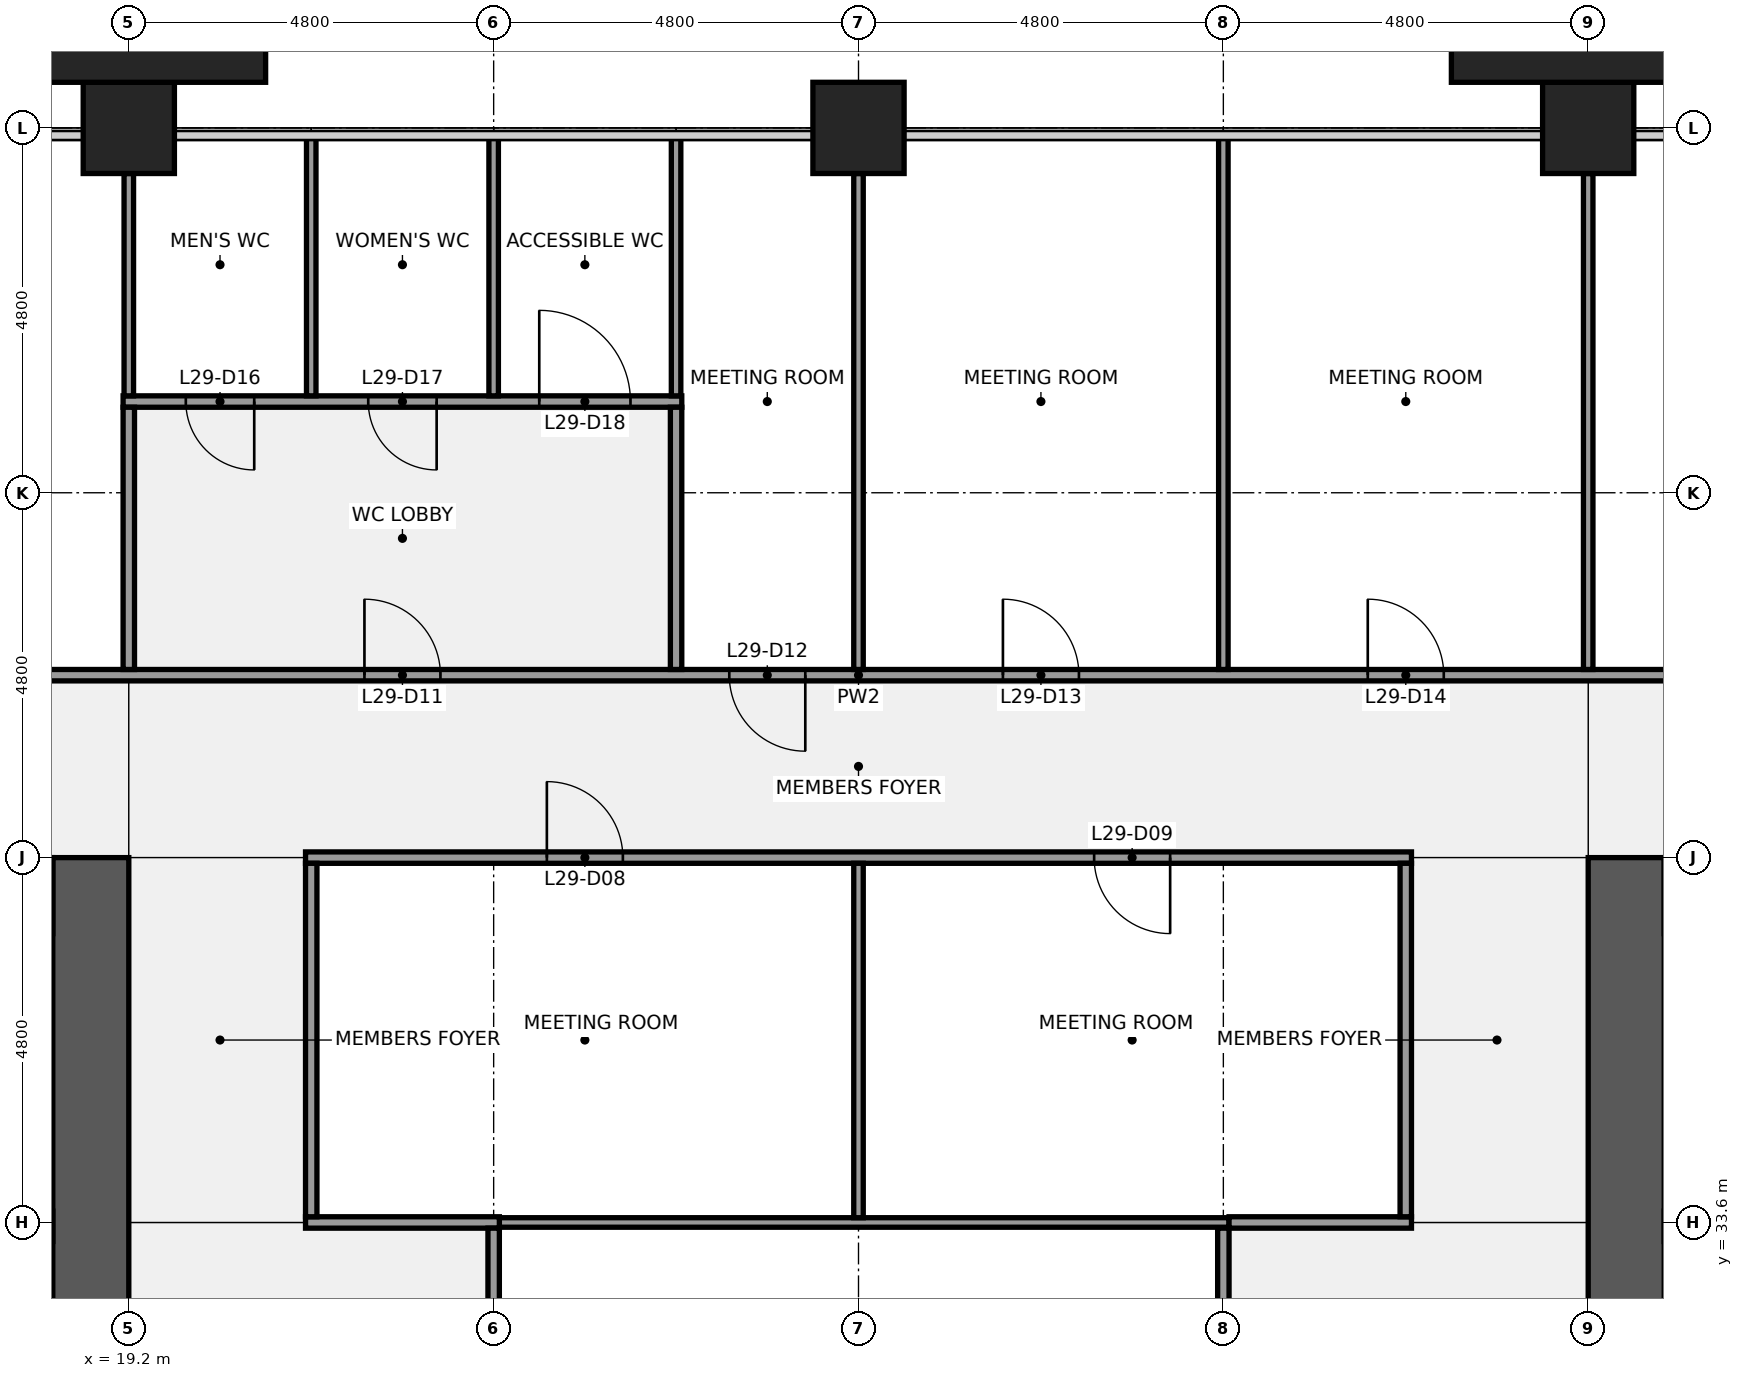
"""IFC4 building model, lengths in metres.
Left out: names, types, materials, properties, quantities, classifications, styles, units other than length and angle.
Written with IfcOpenShell. Run it as: python <this file> out.ifc"""

import sys

from ifc_helpers import new_model, si_unit, direction, frame, frame_2d, origin, origin_2d, place, context, subcontext, project, spatial, rectangle, extrude, element, fill, save


model = new_model("IFC4")
c1 = context("Model", 3, precision=1e-05, world=origin(), true_north=direction((0.0, 1.0)))
c2 = subcontext(c1, "Body", "Model", "MODEL_VIEW")
j1 = project(units=[si_unit("LENGTHUNIT", "METRE"), si_unit("PLANEANGLEUNIT", "RADIAN")], contexts=[c1])
p1 = place(None, origin())
s1 = spatial("IfcSite", under=j1, at=p1, CompositionType="ELEMENT")
p2 = place(p1, origin())
s2 = spatial("IfcBuilding", under=s1, at=p2, CompositionType="ELEMENT")
p3 = place(p2, frame((0.0, 0.0, 136.1)))
s3 = spatial("IfcBuildingStorey", under=s2, at=p3, CompositionType="ELEMENT", Elevation=136.1)
for number, where, z_axis, x_axis in (
    (1, (19.2, 48.0, 0.0), (0.0, 0.0, 1.0), (1.0, 0.0, 0.0)),
    (2, (28.8, 48.0, 0.0), (0.0, 0.0, 1.0), (1.0, 0.0, 0.0)),
    (3, (38.4, 48.0, 0.0), (0.0, 0.0, 1.0), (1.0, 0.0, 0.0)),
):
    element("IfcColumn", number, at=place(p3, frame(where, z_axis=z_axis, x_axis=x_axis)), inside=s3, PredefinedType="COLUMN", context=c2, shape_type="SweptSolid", body=[
        extrude(rectangle(XDim=1.2, YDim=1.2, at=origin_2d()), origin(), (0.0, 0.0, 1.0), 4.0),
    ])
p4 = place(p3, frame((18.7, 38.4, 0.0), z_axis=(0.0, 0.0, 1.0), x_axis=(0.0, -1.0, 0.0)))
e4 = element("IfcWall", 4, at=p4, inside=s3, PredefinedType="SHEAR", context=c2, shape_type="SweptSolid", body=[
    extrude(rectangle(XDim=28.8, YDim=1.0, at=frame_2d((14.4, 0.0))), origin(), (0.0, 0.0, 1.0), 3.84),
])
p5 = place(p4, frame((18.3, 0.0, 0.0)))
e5 = element("IfcOpeningElement", 5, at=p5, cuts=e4, PredefinedType="OPENING", context=c2, shape_type="SweptSolid", body=[
    extrude(rectangle(XDim=1.8, YDim=2.1, at=frame_2d((0.9, 1.05))), frame((0.0, 0.51, 0.0), z_axis=(0.0, -1.0, 0.0), x_axis=(1.0, 0.0, 0.0)), (0.0, 0.0, 1.0), 1.02),
])
p6 = place(p4, frame((8.7, 0.0, 0.0)))
e6 = element("IfcOpeningElement", 6, at=p6, cuts=e4, PredefinedType="OPENING", context=c2, shape_type="SweptSolid", body=[
    extrude(rectangle(XDim=1.8, YDim=2.1, at=frame_2d((0.9, 1.05))), frame((0.0, 0.51, 0.0), z_axis=(0.0, -1.0, 0.0), x_axis=(1.0, 0.0, 0.0)), (0.0, 0.0, 1.0), 1.02),
])
p7 = place(p3, frame((1.0, 33.55, 0.0), z_axis=(0.0, 0.0, 1.0), x_axis=(1.0, 0.0, 0.0)))
e7 = element("IfcWall", 7, at=p7, inside=s3, PredefinedType="SHEAR", context=c2, shape_type="SweptSolid", body=[
    extrude(rectangle(XDim=17.2, YDim=0.4, at=frame_2d((8.6, 0.0))), origin(), (0.0, 0.0, 1.0), 3.84),
])
p8 = place(p3, frame((38.9, 9.6, 0.0), z_axis=(0.0, 0.0, 1.0), x_axis=(0.0, 1.0, 0.0)))
e8 = element("IfcWall", 8, at=p8, inside=s3, PredefinedType="SHEAR", context=c2, shape_type="SweptSolid", body=[
    extrude(rectangle(XDim=28.8, YDim=1.0, at=frame_2d((14.4, 0.0))), origin(), (0.0, 0.0, 1.0), 3.84),
])
p9 = place(p8, frame((8.7, 0.0, 0.0)))
e9 = element("IfcOpeningElement", 9, at=p9, cuts=e8, PredefinedType="OPENING", context=c2, shape_type="SweptSolid", body=[
    extrude(rectangle(XDim=1.8, YDim=2.1, at=frame_2d((0.9, 1.05))), frame((0.0, 0.51, 0.0), z_axis=(0.0, -1.0, 0.0), x_axis=(1.0, 0.0, 0.0)), (0.0, 0.0, 1.0), 1.02),
])
p10 = place(p8, frame((18.3, 0.0, 0.0)))
e10 = element("IfcOpeningElement", 10, at=p10, cuts=e8, PredefinedType="OPENING", context=c2, shape_type="SweptSolid", body=[
    extrude(rectangle(XDim=1.8, YDim=2.1, at=frame_2d((0.9, 1.05))), frame((0.0, 0.51, 0.0), z_axis=(0.0, -1.0, 0.0), x_axis=(1.0, 0.0, 0.0)), (0.0, 0.0, 1.0), 1.02),
])
p11 = place(p3, frame((24.075, 33.6, 0.0), z_axis=(0.0, 0.0, 1.0), x_axis=(1.0, 0.0, 0.0)))
e11 = element("IfcWall", 11, at=p11, inside=s3, PredefinedType="PARTITIONING", context=c2, shape_type="SweptSolid", body=[
    extrude(rectangle(XDim=9.6, YDim=0.125, at=frame_2d((4.8, 0.0))), origin(), (0.0, 0.0, 1.0), 2.849),
])
p12 = place(p3, frame((21.525, 33.6, 0.0), z_axis=(0.0, 0.0, 1.0), x_axis=(1.0, 0.0, 0.0)))
e12 = element("IfcWall", 12, at=p12, inside=s3, PredefinedType="PARTITIONING", context=c2, shape_type="SweptSolid", body=[
    extrude(rectangle(XDim=2.55, YDim=0.15, at=frame_2d((1.275, 0.0))), origin(), (0.0, 0.0, 1.0), 2.849),
])
p13 = place(p3, frame((33.675, 33.6, 0.0), z_axis=(0.0, 0.0, 1.0), x_axis=(1.0, 0.0, 0.0)))
e13 = element("IfcWall", 13, at=p13, inside=s3, PredefinedType="PARTITIONING", context=c2, shape_type="SweptSolid", body=[
    extrude(rectangle(XDim=2.4, YDim=0.15, at=frame_2d((1.2, 0.0))), origin(), (0.0, 0.0, 1.0), 2.849),
])
p14 = place(p3, frame((21.525, 38.4, 0.0), z_axis=(0.0, 0.0, 1.0), x_axis=(1.0, 0.0, 0.0)))
e14 = element("IfcWall", 14, at=p14, inside=s3, PredefinedType="PARTITIONING", context=c2, shape_type="SweptSolid", body=[
    extrude(rectangle(XDim=14.55, YDim=0.15, at=frame_2d((7.275, 0.0))), origin(), (0.0, 0.0, 1.0), 2.849),
])
p15 = place(p14, frame((3.175, 0.0, 0.0)))
e15 = element("IfcOpeningElement", 15, at=p15, cuts=e14, PredefinedType="OPENING", context=c2, shape_type="SweptSolid", body=[
    extrude(rectangle(XDim=1.0, YDim=2.1, at=frame_2d((0.5, 1.05))), frame((0.0, 0.085, 0.0), z_axis=(0.0, -1.0, 0.0), x_axis=(1.0, 0.0, 0.0)), (0.0, 0.0, 1.0), 0.17),
])
p16 = place(p14, frame((10.375, 0.0, 0.0)))
e16 = element("IfcOpeningElement", 16, at=p16, cuts=e14, PredefinedType="OPENING", context=c2, shape_type="SweptSolid", body=[
    extrude(rectangle(XDim=1.0, YDim=2.1, at=frame_2d((0.5, 1.05))), frame((0.0, 0.085, 0.0), z_axis=(0.0, -1.0, 0.0), x_axis=(1.0, 0.0, 0.0)), (0.0, 0.0, 1.0), 0.17),
])
p17 = place(p3, frame((9.525, 40.8, 0.0), z_axis=(0.0, 0.0, 1.0), x_axis=(1.0, 0.0, 0.0)))
e17 = element("IfcWall", 17, at=p17, inside=s3, PredefinedType="PARTITIONING", context=c2, shape_type="SweptSolid", body=[
    extrude(rectangle(XDim=38.55, YDim=0.15, at=frame_2d((19.275, 0.0))), origin(), (0.0, 0.0, 1.0), 2.849),
])
p18 = place(p17, frame((4.375, 0.0, 0.0)))
e18 = element("IfcOpeningElement", 18, at=p18, cuts=e17, PredefinedType="OPENING", context=c2, shape_type="SweptSolid", body=[
    extrude(rectangle(XDim=1.0, YDim=2.1, at=frame_2d((0.5, 1.05))), frame((0.0, 0.085, 0.0), z_axis=(0.0, -1.0, 0.0), x_axis=(1.0, 0.0, 0.0)), (0.0, 0.0, 1.0), 0.17),
])
p19 = place(p17, frame((12.775, 0.0, 0.0)))
e19 = element("IfcOpeningElement", 19, at=p19, cuts=e17, PredefinedType="OPENING", context=c2, shape_type="SweptSolid", body=[
    extrude(rectangle(XDim=1.0, YDim=2.1, at=frame_2d((0.5, 1.05))), frame((0.0, 0.085, 0.0), z_axis=(0.0, -1.0, 0.0), x_axis=(1.0, 0.0, 0.0)), (0.0, 0.0, 1.0), 0.17),
])
p20 = place(p17, frame((17.575, 0.0, 0.0)))
e20 = element("IfcOpeningElement", 20, at=p20, cuts=e17, PredefinedType="OPENING", context=c2, shape_type="SweptSolid", body=[
    extrude(rectangle(XDim=1.0, YDim=2.1, at=frame_2d((0.5, 1.05))), frame((0.0, 0.085, 0.0), z_axis=(0.0, -1.0, 0.0), x_axis=(1.0, 0.0, 0.0)), (0.0, 0.0, 1.0), 0.17),
])
p21 = place(p17, frame((21.175, 0.0, 0.0)))
e21 = element("IfcOpeningElement", 21, at=p21, cuts=e17, PredefinedType="OPENING", context=c2, shape_type="SweptSolid", body=[
    extrude(rectangle(XDim=1.0, YDim=2.1, at=frame_2d((0.5, 1.05))), frame((0.0, 0.085, 0.0), z_axis=(0.0, -1.0, 0.0), x_axis=(1.0, 0.0, 0.0)), (0.0, 0.0, 1.0), 0.17),
])
p22 = place(p17, frame((25.975, 0.0, 0.0)))
e22 = element("IfcOpeningElement", 22, at=p22, cuts=e17, PredefinedType="OPENING", context=c2, shape_type="SweptSolid", body=[
    extrude(rectangle(XDim=1.0, YDim=2.1, at=frame_2d((0.5, 1.05))), frame((0.0, 0.085, 0.0), z_axis=(0.0, -1.0, 0.0), x_axis=(1.0, 0.0, 0.0)), (0.0, 0.0, 1.0), 0.17),
])
p23 = place(p17, frame((33.175, 0.0, 0.0)))
e23 = element("IfcOpeningElement", 23, at=p23, cuts=e17, PredefinedType="OPENING", context=c2, shape_type="SweptSolid", body=[
    extrude(rectangle(XDim=1.0, YDim=2.1, at=frame_2d((0.5, 1.05))), frame((0.0, 0.085, 0.0), z_axis=(0.0, -1.0, 0.0), x_axis=(1.0, 0.0, 0.0)), (0.0, 0.0, 1.0), 0.17),
])
p24 = place(p3, frame((19.125, 44.4, 0.0), z_axis=(0.0, 0.0, 1.0), x_axis=(1.0, 0.0, 0.0)))
e24 = element("IfcWall", 24, at=p24, inside=s3, PredefinedType="PARTITIONING", context=c2, shape_type="SweptSolid", body=[
    extrude(rectangle(XDim=7.35, YDim=0.15, at=frame_2d((3.675, 0.0))), origin(), (0.0, 0.0, 1.0), 2.849),
])
p25 = place(p24, frame((0.825, 0.0, 0.0)))
e25 = element("IfcOpeningElement", 25, at=p25, cuts=e24, PredefinedType="OPENING", context=c2, shape_type="SweptSolid", body=[
    extrude(rectangle(XDim=0.9, YDim=2.1, at=frame_2d((0.45, 1.05))), frame((0.0, 0.085, 0.0), z_axis=(0.0, -1.0, 0.0), x_axis=(1.0, 0.0, 0.0)), (0.0, 0.0, 1.0), 0.17),
])
p26 = place(p24, frame((3.225, 0.0, 0.0)))
e26 = element("IfcOpeningElement", 26, at=p26, cuts=e24, PredefinedType="OPENING", context=c2, shape_type="SweptSolid", body=[
    extrude(rectangle(XDim=0.9, YDim=2.1, at=frame_2d((0.45, 1.05))), frame((0.0, 0.085, 0.0), z_axis=(0.0, -1.0, 0.0), x_axis=(1.0, 0.0, 0.0)), (0.0, 0.0, 1.0), 0.17),
])
p27 = place(p24, frame((5.475, 0.0, 0.0)))
e27 = element("IfcOpeningElement", 27, at=p27, cuts=e24, PredefinedType="OPENING", context=c2, shape_type="SweptSolid", body=[
    extrude(rectangle(XDim=1.2, YDim=2.1, at=frame_2d((0.6, 1.05))), frame((0.0, 0.085, 0.0), z_axis=(0.0, -1.0, 0.0), x_axis=(1.0, 0.0, 0.0)), (0.0, 0.0, 1.0), 0.17),
])
p28 = place(p3, frame((19.2, 44.475, 0.0), z_axis=(0.0, 0.0, 1.0), x_axis=(0.0, 1.0, 0.0)))
e28 = element("IfcWall", 28, at=p28, inside=s3, PredefinedType="PARTITIONING", context=c2, shape_type="SweptSolid", body=[
    extrude(rectangle(XDim=2.925, YDim=0.125, at=frame_2d((1.462, 0.0))), origin(), (0.0, 0.0, 1.0), 2.849),
])
p29 = place(p3, frame((19.2, 40.875, 0.0), z_axis=(0.0, 0.0, 1.0), x_axis=(0.0, 1.0, 0.0)))
e29 = element("IfcWall", 29, at=p29, inside=s3, PredefinedType="PARTITIONING", context=c2, shape_type="SweptSolid", body=[
    extrude(rectangle(XDim=3.45, YDim=0.15, at=frame_2d((1.725, 0.0))), origin(), (0.0, 0.0, 1.0), 2.849),
])
p30 = place(p3, frame((21.6, 44.475, 0.0), z_axis=(0.0, 0.0, 1.0), x_axis=(0.0, 1.0, 0.0)))
e30 = element("IfcWall", 30, at=p30, inside=s3, PredefinedType="PARTITIONING", context=c2, shape_type="SweptSolid", body=[
    extrude(rectangle(XDim=3.425, YDim=0.125, at=frame_2d((1.712, 0.0))), origin(), (0.0, 0.0, 1.0), 2.849),
])
p31 = place(p3, frame((21.6, 33.675, 0.0), z_axis=(0.0, 0.0, 1.0), x_axis=(0.0, 1.0, 0.0)))
e31 = element("IfcWall", 31, at=p31, inside=s3, PredefinedType="PARTITIONING", context=c2, shape_type="SweptSolid", body=[
    extrude(rectangle(XDim=4.65, YDim=0.15, at=frame_2d((2.325, 0.0))), origin(), (0.0, 0.0, 1.0), 2.849),
])
p32 = place(p3, frame((24.0, 44.475, 0.0), z_axis=(0.0, 0.0, 1.0), x_axis=(0.0, 1.0, 0.0)))
e32 = element("IfcWall", 32, at=p32, inside=s3, PredefinedType="PARTITIONING", context=c2, shape_type="SweptSolid", body=[
    extrude(rectangle(XDim=3.425, YDim=0.125, at=frame_2d((1.712, 0.0))), origin(), (0.0, 0.0, 1.0), 2.849),
])
p33 = place(p3, frame((24.0, 28.875, 0.0), z_axis=(0.0, 0.0, 1.0), x_axis=(0.0, 1.0, 0.0)))
e33 = element("IfcWall", 33, at=p33, inside=s3, PredefinedType="PARTITIONING", context=c2, shape_type="SweptSolid", body=[
    extrude(rectangle(XDim=4.65, YDim=0.15, at=frame_2d((2.325, 0.0))), origin(), (0.0, 0.0, 1.0), 2.849),
])
p34 = place(p3, frame((26.4, 44.475, 0.0), z_axis=(0.0, 0.0, 1.0), x_axis=(0.0, 1.0, 0.0)))
e34 = element("IfcWall", 34, at=p34, inside=s3, PredefinedType="PARTITIONING", context=c2, shape_type="SweptSolid", body=[
    extrude(rectangle(XDim=3.425, YDim=0.125, at=frame_2d((1.712, 0.0))), origin(), (0.0, 0.0, 1.0), 2.849),
])
p35 = place(p3, frame((26.4, 40.875, 0.0), z_axis=(0.0, 0.0, 1.0), x_axis=(0.0, 1.0, 0.0)))
e35 = element("IfcWall", 35, at=p35, inside=s3, PredefinedType="PARTITIONING", context=c2, shape_type="SweptSolid", body=[
    extrude(rectangle(XDim=3.45, YDim=0.15, at=frame_2d((1.725, 0.0))), origin(), (0.0, 0.0, 1.0), 2.849),
])
p36 = place(p3, frame((28.8, 33.663, 0.0), z_axis=(0.0, 0.0, 1.0), x_axis=(0.0, 1.0, 0.0)))
e36 = element("IfcWall", 36, at=p36, inside=s3, PredefinedType="PARTITIONING", context=c2, shape_type="SweptSolid", body=[
    extrude(rectangle(XDim=4.662, YDim=0.125, at=frame_2d((2.331, 0.0))), origin(), (0.0, 0.0, 1.0), 2.849),
])
p37 = place(p3, frame((28.8, 40.875, 0.0), z_axis=(0.0, 0.0, 1.0), x_axis=(0.0, 1.0, 0.0)))
e37 = element("IfcWall", 37, at=p37, inside=s3, PredefinedType="PARTITIONING", context=c2, shape_type="SweptSolid", body=[
    extrude(rectangle(XDim=6.525, YDim=0.125, at=frame_2d((3.262, 0.0))), origin(), (0.0, 0.0, 1.0), 2.849),
])
p38 = place(p3, frame((33.6, 40.875, 0.0), z_axis=(0.0, 0.0, 1.0), x_axis=(0.0, 1.0, 0.0)))
e38 = element("IfcWall", 38, at=p38, inside=s3, PredefinedType="PARTITIONING", context=c2, shape_type="SweptSolid", body=[
    extrude(rectangle(XDim=7.025, YDim=0.125, at=frame_2d((3.512, 0.0))), origin(), (0.0, 0.0, 1.0), 2.849),
])
for number, where, z_axis, x_axis in (
    (39, (33.6, 28.875, 0.0), (0.0, 0.0, 1.0), (0.0, 1.0, 0.0)),
    (40, (36.0, 33.675, 0.0), (0.0, 0.0, 1.0), (0.0, 1.0, 0.0)),
):
    element("IfcWall", number, at=place(p3, frame(where, z_axis=z_axis, x_axis=x_axis)), inside=s3, PredefinedType="PARTITIONING", context=c2, shape_type="SweptSolid", body=[
        extrude(rectangle(XDim=4.65, YDim=0.15, at=frame_2d((2.325, 0.0))), origin(), (0.0, 0.0, 1.0), 2.849),
    ])
p39 = place(p3, frame((38.4, 40.875, 0.0), z_axis=(0.0, 0.0, 1.0), x_axis=(0.0, 1.0, 0.0)))
e41 = element("IfcWall", 41, at=p39, inside=s3, PredefinedType="PARTITIONING", context=c2, shape_type="SweptSolid", body=[
    extrude(rectangle(XDim=6.525, YDim=0.125, at=frame_2d((3.262, 0.0))), origin(), (0.0, 0.0, 1.0), 2.849),
])
for number, where, z_axis, x_axis in (
    (42, (19.2, 49.05, 0.0), (0.0, 0.0, 1.0), (1.0, 0.0, 0.0)),
    (43, (38.4, 49.05, 0.0), (0.0, 0.0, 1.0), (1.0, 0.0, 0.0)),
):
    element("IfcColumn", number, at=place(p3, frame(where, z_axis=z_axis, x_axis=x_axis)), inside=s3, PredefinedType="PILASTER", context=c2, shape_type="SweptSolid", body=[
        extrude(rectangle(XDim=3.6, YDim=0.9, at=origin_2d()), origin(), (0.0, 0.0, 1.0), 4.0),
    ])
p40 = place(p15, origin())
e44 = element("IfcDoor", 44, at=p40, inside=s3, OperationType="SINGLE_SWING_LEFT", PredefinedType="DOOR", context=c2, shape_type="SweptSolid", body=[
    extrude(rectangle(XDim=1.0, YDim=2.1, at=frame_2d((0.5, 1.05))), frame((0.0, 0.025, 0.0), z_axis=(0.0, -1.0, 0.0), x_axis=(1.0, 0.0, 0.0)), (0.0, 0.0, 1.0), 0.05),
])
fill(e15, e44)
p41 = place(p16, origin())
e45 = element("IfcDoor", 45, at=p41, inside=s3, OperationType="SINGLE_SWING_RIGHT", PredefinedType="DOOR", context=c2, shape_type="SweptSolid", body=[
    extrude(rectangle(XDim=1.0, YDim=2.1, at=frame_2d((0.5, 1.05))), frame((0.0, 0.025, 0.0), z_axis=(0.0, -1.0, 0.0), x_axis=(1.0, 0.0, 0.0)), (0.0, 0.0, 1.0), 0.05),
])
fill(e16, e45)
p42 = place(p19, origin())
e46 = element("IfcDoor", 46, at=p42, inside=s3, OperationType="SINGLE_SWING_LEFT", PredefinedType="DOOR", context=c2, shape_type="SweptSolid", body=[
    extrude(rectangle(XDim=1.0, YDim=2.1, at=frame_2d((0.5, 1.05))), frame((0.0, 0.025, 0.0), z_axis=(0.0, -1.0, 0.0), x_axis=(1.0, 0.0, 0.0)), (0.0, 0.0, 1.0), 0.05),
])
fill(e19, e46)
p43 = place(p20, origin())
e47 = element("IfcDoor", 47, at=p43, inside=s3, OperationType="SINGLE_SWING_RIGHT", PredefinedType="DOOR", context=c2, shape_type="SweptSolid", body=[
    extrude(rectangle(XDim=1.0, YDim=2.1, at=frame_2d((0.5, 1.05))), frame((0.0, 0.025, 0.0), z_axis=(0.0, -1.0, 0.0), x_axis=(1.0, 0.0, 0.0)), (0.0, 0.0, 1.0), 0.05),
])
fill(e20, e47)
p44 = place(p21, origin())
e48 = element("IfcDoor", 48, at=p44, inside=s3, OperationType="SINGLE_SWING_LEFT", PredefinedType="DOOR", context=c2, shape_type="SweptSolid", body=[
    extrude(rectangle(XDim=1.0, YDim=2.1, at=frame_2d((0.5, 1.05))), frame((0.0, 0.025, 0.0), z_axis=(0.0, -1.0, 0.0), x_axis=(1.0, 0.0, 0.0)), (0.0, 0.0, 1.0), 0.05),
])
fill(e21, e48)
p45 = place(p22, origin())
e49 = element("IfcDoor", 49, at=p45, inside=s3, OperationType="SINGLE_SWING_LEFT", PredefinedType="DOOR", context=c2, shape_type="SweptSolid", body=[
    extrude(rectangle(XDim=1.0, YDim=2.1, at=frame_2d((0.5, 1.05))), frame((0.0, 0.025, 0.0), z_axis=(0.0, -1.0, 0.0), x_axis=(1.0, 0.0, 0.0)), (0.0, 0.0, 1.0), 0.05),
])
fill(e22, e49)
p46 = place(p25, origin())
e50 = element("IfcDoor", 50, at=p46, inside=s3, OperationType="SINGLE_SWING_RIGHT", PredefinedType="DOOR", context=c2, shape_type="SweptSolid", body=[
    extrude(rectangle(XDim=0.9, YDim=2.1, at=frame_2d((0.45, 1.05))), frame((0.0, 0.025, 0.0), z_axis=(0.0, -1.0, 0.0), x_axis=(1.0, 0.0, 0.0)), (0.0, 0.0, 1.0), 0.05),
])
fill(e25, e50)
p47 = place(p26, origin())
e51 = element("IfcDoor", 51, at=p47, inside=s3, OperationType="SINGLE_SWING_RIGHT", PredefinedType="DOOR", context=c2, shape_type="SweptSolid", body=[
    extrude(rectangle(XDim=0.9, YDim=2.1, at=frame_2d((0.45, 1.05))), frame((0.0, 0.025, 0.0), z_axis=(0.0, -1.0, 0.0), x_axis=(1.0, 0.0, 0.0)), (0.0, 0.0, 1.0), 0.05),
])
fill(e26, e51)
p48 = place(p27, origin())
e52 = element("IfcDoor", 52, at=p48, inside=s3, OperationType="SINGLE_SWING_LEFT", PredefinedType="DOOR", context=c2, shape_type="SweptSolid", body=[
    extrude(rectangle(XDim=1.2, YDim=2.1, at=frame_2d((0.6, 1.05))), frame((0.0, 0.025, 0.0), z_axis=(0.0, -1.0, 0.0), x_axis=(1.0, 0.0, 0.0)), (0.0, 0.0, 1.0), 0.05),
])
fill(e27, e52)
save(model, sys.argv[1])
